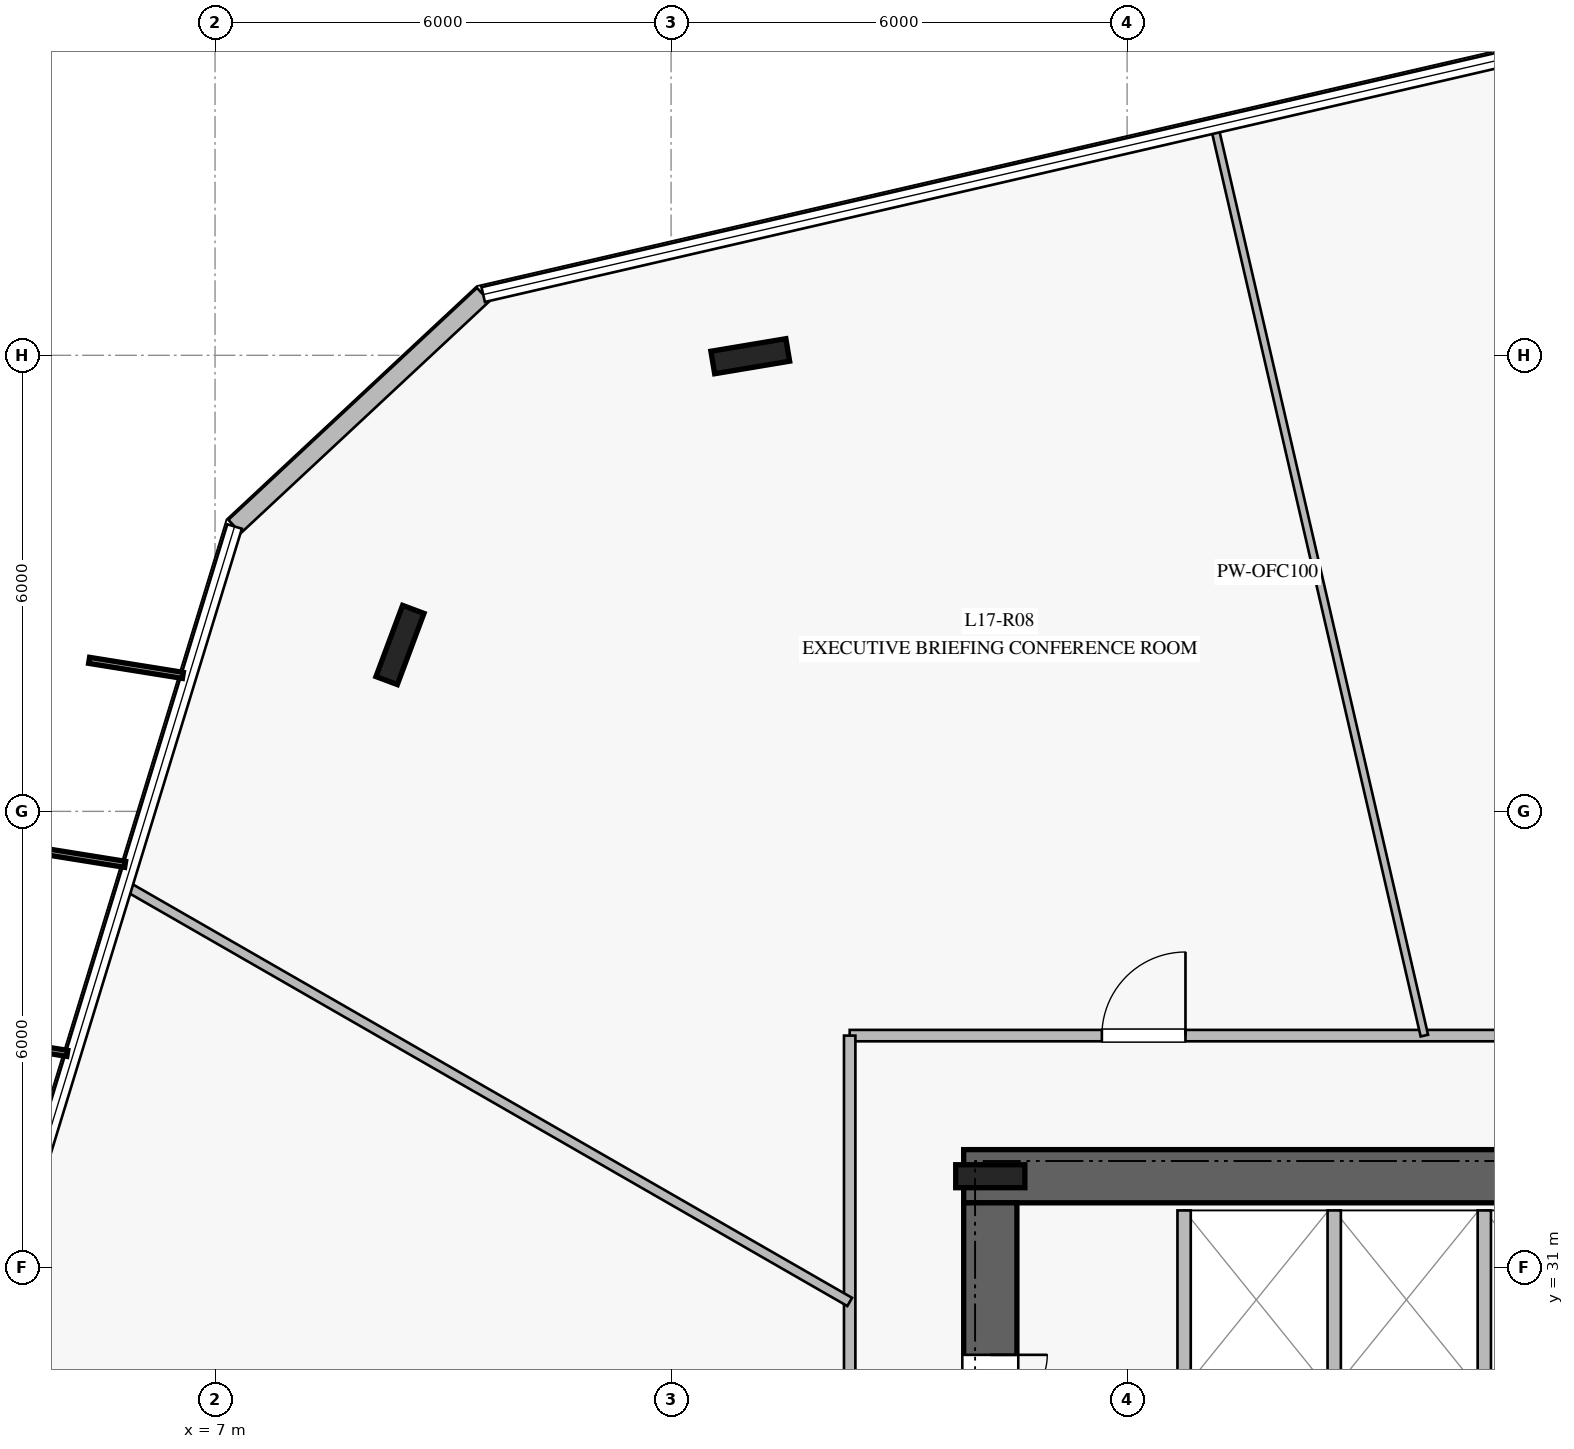
"""IFC4 building model, lengths in metres.
Left out: names, types, materials, properties, quantities, classifications, styles, units other than length and angle.
Written with IfcOpenShell. Run it as: python <this file> out.ifc"""

import sys

from ifc_helpers import new_model, si_unit, direction, frame, frame_2d, origin, origin_2d, place, context, subcontext, project, spatial, rectangle, i_section, extrude, element, fill, save


model = new_model("IFC4")
c1 = context("Model", 3, precision=1e-05, world=origin(), true_north=direction((0.0, 1.0)))
c2 = subcontext(c1, "Body", "Model", "MODEL_VIEW")
j1 = project(units=[si_unit("LENGTHUNIT", "METRE"), si_unit("PLANEANGLEUNIT", "RADIAN")], contexts=[c1])
p1 = place(None, origin())
s1 = spatial("IfcSite", under=j1, at=p1, CompositionType="ELEMENT")
p2 = place(p1, origin())
s2 = spatial("IfcBuilding", under=s1, at=p2, CompositionType="ELEMENT")
p3 = place(p2, frame((0.0, 0.0, 72.0)))
s3 = spatial("IfcBuildingStorey", under=s2, at=p3, CompositionType="ELEMENT", Elevation=72.0)
p4 = place(p3, frame((33.15, 32.2, 0.0), z_axis=(0.0, 0.0, 1.0), x_axis=(-1.0, 0.0, 0.0)))
e1 = element("IfcWall", 1, at=p4, inside=s3, PredefinedType="SHEAR", context=c2, shape_type="SweptSolid", body=[
    extrude(rectangle(XDim=16.3, YDim=0.7, at=frame_2d((8.15, 0.0))), origin(), (0.0, 0.0, 1.0), 3.76),
])
p5 = place(p4, frame((5.1, 0.0, 0.0)))
e2 = element("IfcOpeningElement", 2, at=p5, cuts=e1, PredefinedType="OPENING", context=c2, shape_type="SweptSolid", body=[
    extrude(rectangle(XDim=1.2, YDim=2.25, at=frame_2d((0.6, 1.125))), frame((0.0, 0.36, 0.0), z_axis=(0.0, -1.0, 0.0), x_axis=(1.0, 0.0, 0.0)), (0.0, 0.0, 1.0), 0.72),
])
p6 = place(p3, frame((17.2, 31.85, 0.0), z_axis=(0.0, 0.0, 1.0), x_axis=(0.0, -1.0, 0.0)))
e3 = element("IfcWall", 3, at=p6, inside=s3, PredefinedType="SHEAR", context=c2, shape_type="SweptSolid", body=[
    extrude(rectangle(XDim=13.7, YDim=0.7, at=frame_2d((6.85, 0.0))), origin(), (0.0, 0.0, 1.0), 3.76),
])
p7 = place(p6, frame((2.0, 0.0, 0.0)))
e4 = element("IfcOpeningElement", 4, at=p7, cuts=e3, PredefinedType="OPENING", context=c2, shape_type="SweptSolid", body=[
    extrude(rectangle(XDim=1.5, YDim=2.2, at=frame_2d((0.75, 1.1))), frame((0.0, 0.36, 0.0), z_axis=(0.0, -1.0, 0.0), x_axis=(1.0, 0.0, 0.0)), (0.0, 0.0, 1.0), 0.72),
])
p8 = place(p3, frame((17.2, 32.2, 0.0), z_axis=(0.0, 0.0, 1.0), x_axis=(1.0, 0.0, 0.0)))
e5 = element("IfcColumn", 5, at=p8, inside=s3, PredefinedType="COLUMN", context=c2, shape_type="SweptSolid", body=[
    extrude(i_section(OverallWidth=0.302, OverallDepth=0.91, WebThickness=0.021, FlangeThickness=0.04, at=origin_2d()), origin(), (0.0, 0.0, 1.0), 4.0),
])
for number, where, z_axis, x_axis in (
    (6, (14.042, 42.988, 0.0), (0.0, 0.0, 1.0), (0.986, 0.165, 0.0)),
    (7, (9.433, 39.189, 0.0), (0.0, 0.0, 1.0), (0.35, 0.937, 0.0)),
):
    element("IfcColumn", number, at=place(p3, frame(where, z_axis=z_axis, x_axis=x_axis)), inside=s3, PredefinedType="COLUMN", context=c2, shape_type="SweptSolid", body=[
        extrude(i_section(OverallWidth=0.3, OverallDepth=1.0, WebThickness=0.019, FlangeThickness=0.036, at=origin_2d()), origin(), (0.0, 0.0, 1.0), 4.0),
    ])
p9 = place(p3, frame((10.528, 43.799, 0.0), z_axis=(0.0, 0.0, 1.0), x_axis=(-0.731267590606, -0.682090691133, 0.0)))
e8 = element("IfcWall", 8, at=p9, inside=s3, PredefinedType="STANDARD", context=c2, shape_type="SweptSolid", body=[
    extrude(rectangle(XDim=4.473, YDim=0.24, at=frame_2d((2.237, 0.0))), origin(), (0.0, 0.0, 1.0), 3.76),
])
for number, where, z_axis, x_axis in (
    (9, (19.75, 29.4, 0.0), (0.0, 0.0, 1.0), (0.0, 1.0, 0.0)),
    (10, (21.725, 29.4, 0.0), (0.0, 0.0, 1.0), (0.0, 1.0, 0.0)),
    (11, (23.7, 29.4, 0.0), (0.0, 0.0, 1.0), (0.0, 1.0, 0.0)),
):
    element("IfcWall", number, at=place(p3, frame(where, z_axis=z_axis, x_axis=x_axis)), inside=s3, PredefinedType="PARTITIONING", context=c2, shape_type="SweptSolid", body=[
        extrude(rectangle(XDim=2.35, YDim=0.175, at=frame_2d((1.175, 0.0))), origin(), (0.0, 0.0, 1.0), 3.76),
    ])
p10 = place(p3, frame((15.35, 34.05, 0.0), z_axis=(0.0, 0.0, 1.0), x_axis=(1.0, 0.0, 0.0)))
e12 = element("IfcWall", 12, at=p10, inside=s3, PredefinedType="PARTITIONING", context=c2, shape_type="SweptSolid", body=[
    extrude(rectangle(XDim=19.3, YDim=0.15, at=frame_2d((9.65, 0.0))), origin(), (0.0, 0.0, 1.0), 3.21),
])
p11 = place(p10, frame((16.835, 0.0, 0.0)))
e13 = element("IfcOpeningElement", 13, at=p11, cuts=e12, PredefinedType="OPENING", context=c2, shape_type="SweptSolid", body=[
    extrude(rectangle(XDim=1.1, YDim=2.2, at=frame_2d((0.55, 1.1))), frame((0.0, 0.085, 0.0), z_axis=(0.0, -1.0, 0.0), x_axis=(1.0, 0.0, 0.0)), (0.0, 0.0, 1.0), 0.17),
])
p12 = place(p10, frame((11.052, 0.0, 0.0)))
e14 = element("IfcOpeningElement", 14, at=p12, cuts=e12, PredefinedType="OPENING", context=c2, shape_type="SweptSolid", body=[
    extrude(rectangle(XDim=1.1, YDim=2.2, at=frame_2d((0.55, 1.1))), frame((0.0, 0.085, 0.0), z_axis=(0.0, -1.0, 0.0), x_axis=(1.0, 0.0, 0.0)), (0.0, 0.0, 1.0), 0.17),
])
p13 = place(p10, frame((3.318, 0.0, 0.0)))
e15 = element("IfcOpeningElement", 15, at=p13, cuts=e12, PredefinedType="OPENING", context=c2, shape_type="SweptSolid", body=[
    extrude(rectangle(XDim=1.1, YDim=2.2, at=frame_2d((0.55, 1.1))), frame((0.0, 0.085, 0.0), z_axis=(0.0, -1.0, 0.0), x_axis=(1.0, 0.0, 0.0)), (0.0, 0.0, 1.0), 0.17),
])
p14 = place(p3, frame((15.35, 15.95, 0.0), z_axis=(0.0, 0.0, 1.0), x_axis=(0.0, 1.0, 0.0)))
e16 = element("IfcWall", 16, at=p14, inside=s3, PredefinedType="PARTITIONING", context=c2, shape_type="SweptSolid", body=[
    extrude(rectangle(XDim=18.1, YDim=0.15, at=frame_2d((9.05, 0.0))), origin(), (0.0, 0.0, 1.0), 3.21),
])
p15 = place(p14, frame((9.678, 0.0, 0.0)))
e17 = element("IfcOpeningElement", 17, at=p15, cuts=e16, PredefinedType="OPENING", context=c2, shape_type="SweptSolid", body=[
    extrude(rectangle(XDim=1.1, YDim=2.2, at=frame_2d((0.55, 1.1))), frame((0.0, 0.085, 0.0), z_axis=(0.0, -1.0, 0.0), x_axis=(1.0, 0.0, 0.0)), (0.0, 0.0, 1.0), 0.17),
])
p16 = place(p3, frame((22.911, 34.05, 0.0), z_axis=(0.0, 0.0, 1.0), x_axis=(-0.224987411573, 0.974361670343, 0.0)))
e18 = element("IfcWall", 18, at=p16, inside=s3, PredefinedType="MOVABLE", context=c2, shape_type="SweptSolid", body=[
    extrude(rectangle(XDim=12.267, YDim=0.1, at=frame_2d((6.134, 0.0))), origin(), (0.0, 0.0, 1.0), 3.06),
])
p17 = place(p3, frame((15.35, 30.546, 0.0), z_axis=(0.0, 0.0, 1.0), x_axis=(-0.866962496214, 0.498373384279, 0.0)))
e19 = element("IfcWall", 19, at=p17, inside=s3, PredefinedType="PARTITIONING", context=c2, shape_type="SweptSolid", body=[
    extrude(rectangle(XDim=10.982, YDim=0.125, at=frame_2d((5.491, 0.0))), origin(), (0.0, 0.0, 1.0), 3.05),
])
p18 = place(p7, origin())
e20 = element("IfcDoor", 20, at=p18, inside=s3, OperationType="DOUBLE_DOOR_SINGLE_SWING", PredefinedType="DOOR", context=c2, shape_type="SweptSolid", body=[
    extrude(rectangle(XDim=1.5, YDim=2.2, at=frame_2d((0.75, 1.1))), frame((0.0, 0.025, 0.0), z_axis=(0.0, -1.0, 0.0), x_axis=(1.0, 0.0, 0.0)), (0.0, 0.0, 1.0), 0.05),
])
fill(e4, e20)
p19 = place(p13, origin())
e21 = element("IfcDoor", 21, at=p19, inside=s3, OperationType="SINGLE_SWING_RIGHT", PredefinedType="DOOR", context=c2, shape_type="SweptSolid", body=[
    extrude(rectangle(XDim=1.1, YDim=2.2, at=frame_2d((0.55, 1.1))), frame((0.0, 0.025, 0.0), z_axis=(0.0, -1.0, 0.0), x_axis=(1.0, 0.0, 0.0)), (0.0, 0.0, 1.0), 0.05),
])
fill(e15, e21)
save(model, sys.argv[1])
